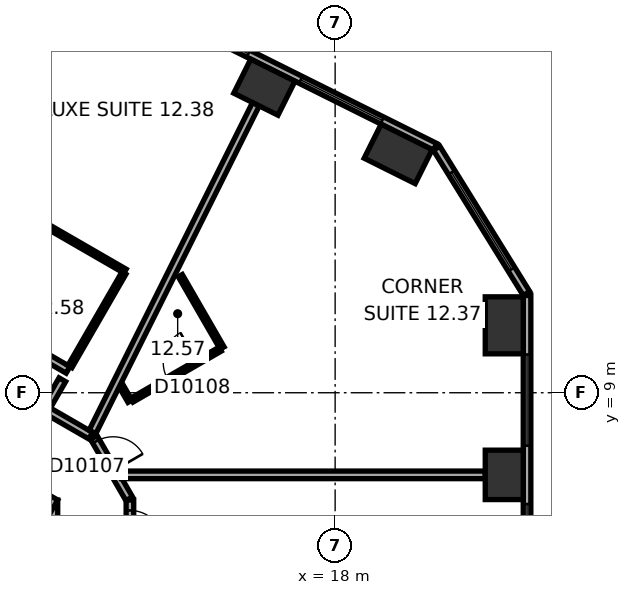
"""IFC4 building model, lengths in metres.
Left out: names, types, materials, properties, quantities, classifications, styles, units other than length and angle.
Written with IfcOpenShell. Run it as: python <this file> out.ifc"""

import sys

from ifc_helpers import new_model, si_unit, direction, frame, frame_2d, origin, origin_2d, place, context, subcontext, project, spatial, rectangle, extrude, element, fill, save


model = new_model("IFC4")
c1 = context("Model", 3, precision=1e-05, world=origin(), true_north=direction((0.0, 1.0)))
c2 = subcontext(c1, "Body", "Model", "MODEL_VIEW")
j1 = project(units=[si_unit("LENGTHUNIT", "METRE"), si_unit("PLANEANGLEUNIT", "RADIAN")], contexts=[c1])
p1 = place(None, origin())
s1 = spatial("IfcSite", under=j1, at=p1, CompositionType="ELEMENT")
p2 = place(p1, origin())
s2 = spatial("IfcBuilding", under=s1, at=p2, CompositionType="ELEMENT")
p3 = place(p2, frame((0.0, 0.0, 60.5)))
s3 = spatial("IfcBuildingStorey", under=s2, at=p3, CompositionType="ELEMENT", Elevation=60.5)
p4 = place(p3, frame((22.45, 6.839, 0.0), z_axis=(0.0, 0.0, 1.0), x_axis=(0.0, 1.0, 0.0)))
e1 = element("IfcColumn", 1, at=p4, inside=s3, PredefinedType="COLUMN", context=c2, shape_type="SweptSolid", body=[
    extrude(rectangle(XDim=1.3, YDim=1.0, at=origin_2d()), origin(), (0.0, 0.0, 1.0), 3.3),
])
for number, where, z_axis, x_axis in (
    (2, (22.45, 10.774, 0.0), (0.0, 0.0, 1.0), (0.0, 1.0, 0.0)),
    (3, (19.659, 15.284, 0.0), (0.0, 0.0, 1.0), (-0.895, 0.446, 0.0)),
):
    element("IfcColumn", number, at=place(p3, frame(where, z_axis=z_axis, x_axis=x_axis)), inside=s3, PredefinedType="COLUMN", context=c2, shape_type="SweptSolid", body=[
        extrude(rectangle(XDim=1.5, YDim=1.0, at=origin_2d()), origin(), (0.0, 0.0, 1.0), 3.3),
    ])
p5 = place(p3, frame((16.138, 17.04, 0.0), z_axis=(0.0, 0.0, 1.0), x_axis=(-0.894934361602, 0.44619781311, 0.0)))
e4 = element("IfcColumn", 4, at=p5, inside=s3, PredefinedType="COLUMN", context=c2, shape_type="SweptSolid", body=[
    extrude(rectangle(XDim=1.3, YDim=1.0, at=origin_2d()), origin(), (0.0, 0.0, 1.0), 3.3),
])
p6 = place(p3, frame((10.1, -6.177, 0.0), z_axis=(0.0, 0.0, 1.0), x_axis=(0.0, 1.0, 0.0)))
e5 = element("IfcWall", 5, at=p6, inside=s3, PredefinedType="SHEAR", context=c2, shape_type="SweptSolid", body=[
    extrude(rectangle(XDim=12.355, YDim=1.2, at=frame_2d((6.177, 0.0))), origin(), (0.0, 0.0, 1.0), 3.3),
])
p7 = place(p6, frame((6.378, 0.0, 0.0)))
e6 = element("IfcOpeningElement", 6, at=p7, cuts=e5, PredefinedType="OPENING", context=c2, shape_type="SweptSolid", body=[
    extrude(rectangle(XDim=1.5, YDim=2.1, at=frame_2d((0.75, 1.05))), frame((0.0, 0.61, 0.0), z_axis=(0.0, -1.0, 0.0), x_axis=(1.0, 0.0, 0.0)), (0.0, 0.0, 1.0), 1.22),
])
p8 = place(p6, frame((1.828, 0.0, 0.0)))
e7 = element("IfcOpeningElement", 7, at=p8, cuts=e5, PredefinedType="OPENING", context=c2, shape_type="SweptSolid", body=[
    extrude(rectangle(XDim=1.1, YDim=2.1, at=frame_2d((0.55, 1.05))), frame((0.0, 0.61, 0.0), z_axis=(0.0, -1.0, 0.0), x_axis=(1.0, 0.0, 0.0)), (0.0, 0.0, 1.0), 1.22),
])
p9 = place(p6, frame((4.427, 0.0, 0.0)))
e8 = element("IfcOpeningElement", 8, at=p9, cuts=e5, PredefinedType="OPENING", context=c2, shape_type="SweptSolid", body=[
    extrude(rectangle(XDim=1.1, YDim=2.1, at=frame_2d((0.55, 1.05))), frame((0.0, 0.61, 0.0), z_axis=(0.0, -1.0, 0.0), x_axis=(1.0, 0.0, 0.0)), (0.0, 0.0, 1.0), 1.22),
])
p10 = place(p3, frame((10.4, 5.658, 0.0), z_axis=(0.0, 0.0, 1.0), x_axis=(-0.866021384402, 0.500006961711, 0.0)))
e9 = element("IfcWall", 9, at=p10, inside=s3, PredefinedType="SHEAR", context=c2, shape_type="SweptSolid", body=[
    extrude(rectangle(XDim=12.355, YDim=1.2, at=frame_2d((6.178, 0.0))), origin(), (0.0, 0.0, 1.0), 3.3),
])
p11 = place(p10, frame((2.728, 0.0, 0.0)))
e10 = element("IfcOpeningElement", 10, at=p11, cuts=e9, PredefinedType="OPENING", context=c2, shape_type="SweptSolid", body=[
    extrude(rectangle(XDim=1.1, YDim=2.1, at=frame_2d((0.55, 1.05))), frame((0.0, 0.61, 0.0), z_axis=(0.0, -1.0, 0.0), x_axis=(1.0, 0.0, 0.0)), (0.0, 0.0, 1.0), 1.22),
])
p12 = place(p10, frame((5.328, 0.0, 0.0)))
e11 = element("IfcOpeningElement", 11, at=p12, cuts=e9, PredefinedType="OPENING", context=c2, shape_type="SweptSolid", body=[
    extrude(rectangle(XDim=1.1, YDim=2.1, at=frame_2d((0.55, 1.05))), frame((0.0, 0.61, 0.0), z_axis=(0.0, -1.0, 0.0), x_axis=(1.0, 0.0, 0.0)), (0.0, 0.0, 1.0), 1.22),
])
p13 = place(p10, frame((7.928, 0.0, 0.0)))
e12 = element("IfcOpeningElement", 12, at=p13, cuts=e9, PredefinedType="OPENING", context=c2, shape_type="SweptSolid", body=[
    extrude(rectangle(XDim=1.1, YDim=2.1, at=frame_2d((0.55, 1.05))), frame((0.0, 0.61, 0.0), z_axis=(0.0, -1.0, 0.0), x_axis=(1.0, 0.0, 0.0)), (0.0, 0.0, 1.0), 1.22),
])
p14 = place(p3, frame((23.05, -9.687, 0.0), z_axis=(0.0, 0.0, 1.0), x_axis=(0.0, 1.0, 0.0)))
e13 = element("IfcWall", 13, at=p14, inside=s3, PredefinedType="STANDARD", context=c2, shape_type="SweptSolid", body=[
    extrude(rectangle(XDim=21.246, YDim=0.2, at=frame_2d((10.623, 0.0))), origin(), (0.0, 0.0, 1.0), 3.3),
])
p15 = place(p14, frame((1.555, 0.0, 0.8)))
e14 = element("IfcOpeningElement", 14, at=p15, cuts=e13, PredefinedType="OPENING", context=c2, shape_type="SweptSolid", body=[
    extrude(rectangle(XDim=2.4, YDim=1.7, at=frame_2d((1.2, 0.85))), frame((0.0, 0.11, 0.0), z_axis=(0.0, -1.0, 0.0), x_axis=(1.0, 0.0, 0.0)), (0.0, 0.0, 1.0), 0.22),
])
p16 = place(p14, frame((5.489, 0.0, 0.8)))
e15 = element("IfcOpeningElement", 15, at=p16, cuts=e13, PredefinedType="OPENING", context=c2, shape_type="SweptSolid", body=[
    extrude(rectangle(XDim=2.4, YDim=1.7, at=frame_2d((1.2, 0.85))), frame((0.0, 0.11, 0.0), z_axis=(0.0, -1.0, 0.0), x_axis=(1.0, 0.0, 0.0)), (0.0, 0.0, 1.0), 0.22),
])
p17 = place(p14, frame((9.424, 0.0, 0.8)))
e16 = element("IfcOpeningElement", 16, at=p17, cuts=e13, PredefinedType="OPENING", context=c2, shape_type="SweptSolid", body=[
    extrude(rectangle(XDim=2.4, YDim=1.7, at=frame_2d((1.2, 0.85))), frame((0.0, 0.11, 0.0), z_axis=(0.0, -1.0, 0.0), x_axis=(1.0, 0.0, 0.0)), (0.0, 0.0, 1.0), 0.22),
])
p18 = place(p14, frame((13.358, 0.0, 0.8)))
e17 = element("IfcOpeningElement", 17, at=p18, cuts=e13, PredefinedType="OPENING", context=c2, shape_type="SweptSolid", body=[
    extrude(rectangle(XDim=2.4, YDim=1.7, at=frame_2d((1.2, 0.85))), frame((0.0, 0.11, 0.0), z_axis=(0.0, -1.0, 0.0), x_axis=(1.0, 0.0, 0.0)), (0.0, 0.0, 1.0), 0.22),
])
p19 = place(p14, frame((17.293, 0.0, 0.8)))
e18 = element("IfcOpeningElement", 18, at=p19, cuts=e13, PredefinedType="OPENING", context=c2, shape_type="SweptSolid", body=[
    extrude(rectangle(XDim=2.4, YDim=1.7, at=frame_2d((1.2, 0.85))), frame((0.0, 0.11, 0.0), z_axis=(0.0, -1.0, 0.0), x_axis=(1.0, 0.0, 0.0)), (0.0, 0.0, 1.0), 0.22),
])
p20 = place(p3, frame((23.035, 11.612, 0.0), z_axis=(0.0, 0.0, 1.0), x_axis=(-0.526160091227, 0.850385535155, 0.0)))
e19 = element("IfcWall", 19, at=p20, inside=s3, PredefinedType="STANDARD", context=c2, shape_type="SweptSolid", body=[
    extrude(rectangle(XDim=4.494, YDim=0.2, at=frame_2d((2.247, 0.0))), origin(), (0.0, 0.0, 1.0), 3.3),
])
p21 = place(p20, frame((0.747, 0.0, 0.8)))
e20 = element("IfcOpeningElement", 20, at=p21, cuts=e19, PredefinedType="OPENING", context=c2, shape_type="SweptSolid", body=[
    extrude(rectangle(XDim=3.0, YDim=1.7, at=frame_2d((1.5, 0.85))), frame((0.0, 0.11, 0.0), z_axis=(0.0, -1.0, 0.0), x_axis=(1.0, 0.0, 0.0)), (0.0, 0.0, 1.0), 0.22),
])
p22 = place(p3, frame((20.63, 15.47, 0.0), z_axis=(0.0, 0.0, 1.0), x_axis=(-0.894934518609, 0.446197498203, 0.0)))
e21 = element("IfcWall", 21, at=p22, inside=s3, PredefinedType="STANDARD", context=c2, shape_type="SweptSolid", body=[
    extrude(rectangle(XDim=21.246, YDim=0.2, at=frame_2d((10.623, 0.0))), origin(), (0.0, 0.0, 1.0), 3.3),
])
p23 = place(p22, frame((1.553, 0.0, 0.8)))
e22 = element("IfcOpeningElement", 22, at=p23, cuts=e21, PredefinedType="OPENING", context=c2, shape_type="SweptSolid", body=[
    extrude(rectangle(XDim=2.4, YDim=1.7, at=frame_2d((1.2, 0.85))), frame((0.0, 0.11, 0.0), z_axis=(0.0, -1.0, 0.0), x_axis=(1.0, 0.0, 0.0)), (0.0, 0.0, 1.0), 0.22),
])
p24 = place(p22, frame((5.488, 0.0, 0.8)))
e23 = element("IfcOpeningElement", 23, at=p24, cuts=e21, PredefinedType="OPENING", context=c2, shape_type="SweptSolid", body=[
    extrude(rectangle(XDim=2.4, YDim=1.7, at=frame_2d((1.2, 0.85))), frame((0.0, 0.11, 0.0), z_axis=(0.0, -1.0, 0.0), x_axis=(1.0, 0.0, 0.0)), (0.0, 0.0, 1.0), 0.22),
])
p25 = place(p22, frame((9.422, 0.0, 0.8)))
e24 = element("IfcOpeningElement", 24, at=p25, cuts=e21, PredefinedType="OPENING", context=c2, shape_type="SweptSolid", body=[
    extrude(rectangle(XDim=2.4, YDim=1.7, at=frame_2d((1.2, 0.85))), frame((0.0, 0.11, 0.0), z_axis=(0.0, -1.0, 0.0), x_axis=(1.0, 0.0, 0.0)), (0.0, 0.0, 1.0), 0.22),
])
p26 = place(p22, frame((13.357, 0.0, 0.8)))
e25 = element("IfcOpeningElement", 25, at=p26, cuts=e21, PredefinedType="OPENING", context=c2, shape_type="SweptSolid", body=[
    extrude(rectangle(XDim=2.4, YDim=1.7, at=frame_2d((1.2, 0.85))), frame((0.0, 0.11, 0.0), z_axis=(0.0, -1.0, 0.0), x_axis=(1.0, 0.0, 0.0)), (0.0, 0.0, 1.0), 0.22),
])
p27 = place(p22, frame((17.292, 0.0, 0.8)))
e26 = element("IfcOpeningElement", 26, at=p27, cuts=e21, PredefinedType="OPENING", context=c2, shape_type="SweptSolid", body=[
    extrude(rectangle(XDim=2.4, YDim=1.7, at=frame_2d((1.2, 0.85))), frame((0.0, 0.11, 0.0), z_axis=(0.0, -1.0, 0.0), x_axis=(1.0, 0.0, 0.0)), (0.0, 0.0, 1.0), 0.22),
])
p28 = place(p3, frame((9.926, 13.67, 0.0), z_axis=(0.0, 0.0, 1.0), x_axis=(0.866032090307, -0.499988418424, 0.0)))
e27 = element("IfcWall", 27, at=p28, inside=s3, PredefinedType="PARTITIONING", context=c2, shape_type="SweptSolid", body=[
    extrude(rectangle(XDim=2.94, YDim=0.12, at=frame_2d((1.47, 0.0))), origin(), (0.0, 0.0, 1.0), 3.05),
])
p29 = place(p3, frame((10.371, 8.561, 0.0), z_axis=(0.0, 0.0, 1.0), x_axis=(0.50004290449, 0.866000631449, 0.0)))
e28 = element("IfcWall", 28, at=p29, inside=s3, PredefinedType="PARTITIONING", context=c2, shape_type="SweptSolid", body=[
    extrude(rectangle(XDim=0.901, YDim=0.2, at=frame_2d((0.451, 0.0))), origin(), (0.0, 0.0, 1.0), 3.05),
])
p30 = place(p3, frame((10.972, 9.602, 0.0), z_axis=(0.0, 0.0, 1.0), x_axis=(-0.866033277307, 0.499986362411, 0.0)))
e29 = element("IfcWall", 29, at=p30, inside=s3, PredefinedType="PARTITIONING", context=c2, shape_type="SweptSolid", body=[
    extrude(rectangle(XDim=8.702, YDim=0.2, at=frame_2d((4.351, 0.0))), origin(), (0.0, 0.0, 1.0), 3.05),
])
p31 = place(p30, frame((4.364, 0.0, 0.0)))
e30 = element("IfcOpeningElement", 30, at=p31, cuts=e29, PredefinedType="OPENING", context=c2, shape_type="SweptSolid", body=[
    extrude(rectangle(XDim=0.9, YDim=2.1, at=frame_2d((0.45, 1.05))), frame((0.0, 0.11, 0.0), z_axis=(0.0, -1.0, 0.0), x_axis=(1.0, 0.0, 0.0)), (0.0, 0.0, 1.0), 0.22),
])
p32 = place(p3, frame((11.566, 7.871, 0.0), z_axis=(0.0, 0.0, 1.0), x_axis=(-0.866004557827, 0.500036104519, 0.0)))
e31 = element("IfcWall", 31, at=p32, inside=s3, PredefinedType="PARTITIONING", context=c2, shape_type="SweptSolid", body=[
    extrude(rectangle(XDim=1.28, YDim=0.2, at=frame_2d((0.64, 0.0))), origin(), (0.0, 0.0, 1.0), 3.05),
])
p33 = place(p3, frame((12.442, 12.148, 0.0), z_axis=(0.0, 0.0, 1.0), x_axis=(-0.49994816717, -0.866055327414, 0.0)))
e32 = element("IfcWall", 32, at=p33, inside=s3, PredefinedType="PARTITIONING", context=c2, shape_type="SweptSolid", body=[
    extrude(rectangle(XDim=2.84, YDim=0.12, at=frame_2d((1.42, 0.0))), origin(), (0.0, 0.0, 1.0), 3.05),
])
p34 = place(p3, frame((12.58, 6.212, 0.0), z_axis=(0.0, 0.0, 1.0), x_axis=(-0.500063286585, 0.865988862174, 0.0)))
e33 = element("IfcWall", 33, at=p34, inside=s3, PredefinedType="PARTITIONING", context=c2, shape_type="SweptSolid", body=[
    extrude(rectangle(XDim=1.86, YDim=0.2, at=frame_2d((0.93, 0.0))), origin(), (0.0, 0.0, 1.0), 3.05),
])
p35 = place(p34, frame((0.842, 0.0, 0.0)))
e34 = element("IfcOpeningElement", 34, at=p35, cuts=e33, PredefinedType="OPENING", context=c2, shape_type="SweptSolid", body=[
    extrude(rectangle(XDim=0.9, YDim=2.1, at=frame_2d((0.45, 1.05))), frame((0.0, 0.11, 0.0), z_axis=(0.0, -1.0, 0.0), x_axis=(1.0, 0.0, 0.0)), (0.0, 0.0, 1.0), 0.22),
])
p36 = place(p3, frame((12.6, 3.004, 0.0), z_axis=(0.0, 0.0, 1.0), x_axis=(0.0, 1.0, 0.0)))
e35 = element("IfcWall", 35, at=p36, inside=s3, PredefinedType="PARTITIONING", context=c2, shape_type="SweptSolid", body=[
    extrude(rectangle(XDim=3.173, YDim=0.2, at=frame_2d((1.586, 0.0))), origin(), (0.0, 0.0, 1.0), 3.05),
])
p37 = place(p36, frame((1.998, 0.0, 0.0)))
e36 = element("IfcOpeningElement", 36, at=p37, cuts=e35, PredefinedType="OPENING", context=c2, shape_type="SweptSolid", body=[
    extrude(rectangle(XDim=0.9, YDim=2.1, at=frame_2d((0.45, 1.05))), frame((0.0, 0.11, 0.0), z_axis=(0.0, -1.0, 0.0), x_axis=(1.0, 0.0, 0.0)), (0.0, 0.0, 1.0), 0.22),
])
p38 = place(p3, frame((12.601, 8.776, 0.0), z_axis=(0.0, 0.0, 1.0), x_axis=(-0.500166486798, 0.865929261247, 0.0)))
e37 = element("IfcWall", 37, at=p38, inside=s3, PredefinedType="PARTITIONING", context=c2, shape_type="SweptSolid", body=[
    extrude(rectangle(XDim=0.476, YDim=0.12, at=frame_2d((0.238, 0.0))), origin(), (0.0, 0.0, 1.0), 3.05),
])
p39 = place(p3, frame((13.926, 12.081, 0.0), z_axis=(0.0, 0.0, 1.0), x_axis=(0.499994660107, -0.866028486751, 0.0)))
e38 = element("IfcWall", 38, at=p39, inside=s3, PredefinedType="PARTITIONING", context=c2, shape_type="SweptSolid", body=[
    extrude(rectangle(XDim=2.2, YDim=0.12, at=frame_2d((1.1, 0.0))), origin(), (0.0, 0.0, 1.0), 3.05),
])
p40 = place(p3, frame((14.974, 10.146, 0.0), z_axis=(0.0, 0.0, 1.0), x_axis=(-0.86599746015, -0.500048396672, 0.0)))
e39 = element("IfcWall", 39, at=p40, inside=s3, PredefinedType="PARTITIONING", context=c2, shape_type="SweptSolid", body=[
    extrude(rectangle(XDim=2.68, YDim=0.12, at=frame_2d((1.34, 0.0))), origin(), (0.0, 0.0, 1.0), 3.05),
])
p41 = place(p40, frame((0.69, 0.0, 0.0)))
e40 = element("IfcOpeningElement", 40, at=p41, cuts=e39, PredefinedType="OPENING", context=c2, shape_type="SweptSolid", body=[
    extrude(rectangle(XDim=0.9, YDim=2.1, at=frame_2d((0.45, 1.05))), frame((0.0, 0.07, 0.0), z_axis=(0.0, -1.0, 0.0), x_axis=(1.0, 0.0, 0.0)), (0.0, 0.0, 1.0), 0.14),
])
p42 = place(p3, frame((15.915, 16.592, 0.0), z_axis=(0.0, 0.0, 1.0), x_axis=(-0.446199736347, -0.894933402709, 0.0)))
e41 = element("IfcWall", 41, at=p42, inside=s3, PredefinedType="PARTITIONING", context=c2, shape_type="SweptSolid", body=[
    extrude(rectangle(XDim=9.635, YDim=0.2, at=frame_2d((4.817, 0.0))), origin(), (0.0, 0.0, 1.0), 3.05),
])
p43 = place(p3, frame((21.95, 6.839, 0.0), z_axis=(0.0, 0.0, 1.0), x_axis=(-1.0, 0.0, 0.0)))
e42 = element("IfcWall", 42, at=p43, inside=s3, PredefinedType="PARTITIONING", context=c2, shape_type="SweptSolid", body=[
    extrude(rectangle(XDim=9.572, YDim=0.2, at=frame_2d((4.786, 0.0))), origin(), (0.0, 0.0, 1.0), 3.05),
])
p44 = place(p18, origin())
e43 = element("IfcWindow", 43, at=p44, inside=s3, PartitioningType="SINGLE_PANEL", PredefinedType="WINDOW", context=c2, shape_type="SweptSolid", body=[
    extrude(rectangle(XDim=2.4, YDim=1.7, at=frame_2d((1.2, 0.85))), frame((0.0, 0.03, 0.0), z_axis=(0.0, -1.0, 0.0), x_axis=(1.0, 0.0, 0.0)), (0.0, 0.0, 1.0), 0.06),
])
fill(e17, e43)
p45 = place(p19, origin())
e44 = element("IfcWindow", 44, at=p45, inside=s3, PartitioningType="SINGLE_PANEL", PredefinedType="WINDOW", context=c2, shape_type="SweptSolid", body=[
    extrude(rectangle(XDim=2.4, YDim=1.7, at=frame_2d((1.2, 0.85))), frame((0.0, 0.03, 0.0), z_axis=(0.0, -1.0, 0.0), x_axis=(1.0, 0.0, 0.0)), (0.0, 0.0, 1.0), 0.06),
])
fill(e18, e44)
p46 = place(p21, origin())
e45 = element("IfcWindow", 45, at=p46, inside=s3, PartitioningType="SINGLE_PANEL", PredefinedType="WINDOW", context=c2, shape_type="SweptSolid", body=[
    extrude(rectangle(XDim=3.0, YDim=1.7, at=frame_2d((1.5, 0.85))), frame((0.0, 0.03, 0.0), z_axis=(0.0, -1.0, 0.0), x_axis=(1.0, 0.0, 0.0)), (0.0, 0.0, 1.0), 0.06),
])
fill(e20, e45)
p47 = place(p23, origin())
e46 = element("IfcWindow", 46, at=p47, inside=s3, PartitioningType="SINGLE_PANEL", PredefinedType="WINDOW", context=c2, shape_type="SweptSolid", body=[
    extrude(rectangle(XDim=2.4, YDim=1.7, at=frame_2d((1.2, 0.85))), frame((0.0, 0.03, 0.0), z_axis=(0.0, -1.0, 0.0), x_axis=(1.0, 0.0, 0.0)), (0.0, 0.0, 1.0), 0.06),
])
fill(e22, e46)
p48 = place(p24, origin())
e47 = element("IfcWindow", 47, at=p48, inside=s3, PartitioningType="SINGLE_PANEL", PredefinedType="WINDOW", context=c2, shape_type="SweptSolid", body=[
    extrude(rectangle(XDim=2.4, YDim=1.7, at=frame_2d((1.2, 0.85))), frame((0.0, 0.03, 0.0), z_axis=(0.0, -1.0, 0.0), x_axis=(1.0, 0.0, 0.0)), (0.0, 0.0, 1.0), 0.06),
])
fill(e23, e47)
p49 = place(p37, origin())
e48 = element("IfcDoor", 48, at=p49, inside=s3, OperationType="SINGLE_SWING_LEFT", PredefinedType="DOOR", context=c2, shape_type="SweptSolid", body=[
    extrude(rectangle(XDim=0.9, YDim=2.1, at=frame_2d((0.45, 1.05))), frame((0.0, 0.025, 0.0), z_axis=(0.0, -1.0, 0.0), x_axis=(1.0, 0.0, 0.0)), (0.0, 0.0, 1.0), 0.05),
])
fill(e36, e48)
p50 = place(p35, origin())
e49 = element("IfcDoor", 49, at=p50, inside=s3, OperationType="SINGLE_SWING_LEFT", PredefinedType="DOOR", context=c2, shape_type="SweptSolid", body=[
    extrude(rectangle(XDim=0.9, YDim=2.1, at=frame_2d((0.45, 1.05))), frame((0.0, 0.025, 0.0), z_axis=(0.0, -1.0, 0.0), x_axis=(1.0, 0.0, 0.0)), (0.0, 0.0, 1.0), 0.05),
])
fill(e34, e49)
p51 = place(p41, origin())
e50 = element("IfcDoor", 50, at=p51, inside=s3, OperationType="SINGLE_SWING_LEFT", PredefinedType="DOOR", context=c2, shape_type="SweptSolid", body=[
    extrude(rectangle(XDim=0.9, YDim=2.1, at=frame_2d((0.45, 1.05))), frame((0.0, 0.025, 0.0), z_axis=(0.0, -1.0, 0.0), x_axis=(1.0, 0.0, 0.0)), (0.0, 0.0, 1.0), 0.05),
])
fill(e40, e50)
save(model, sys.argv[1])
